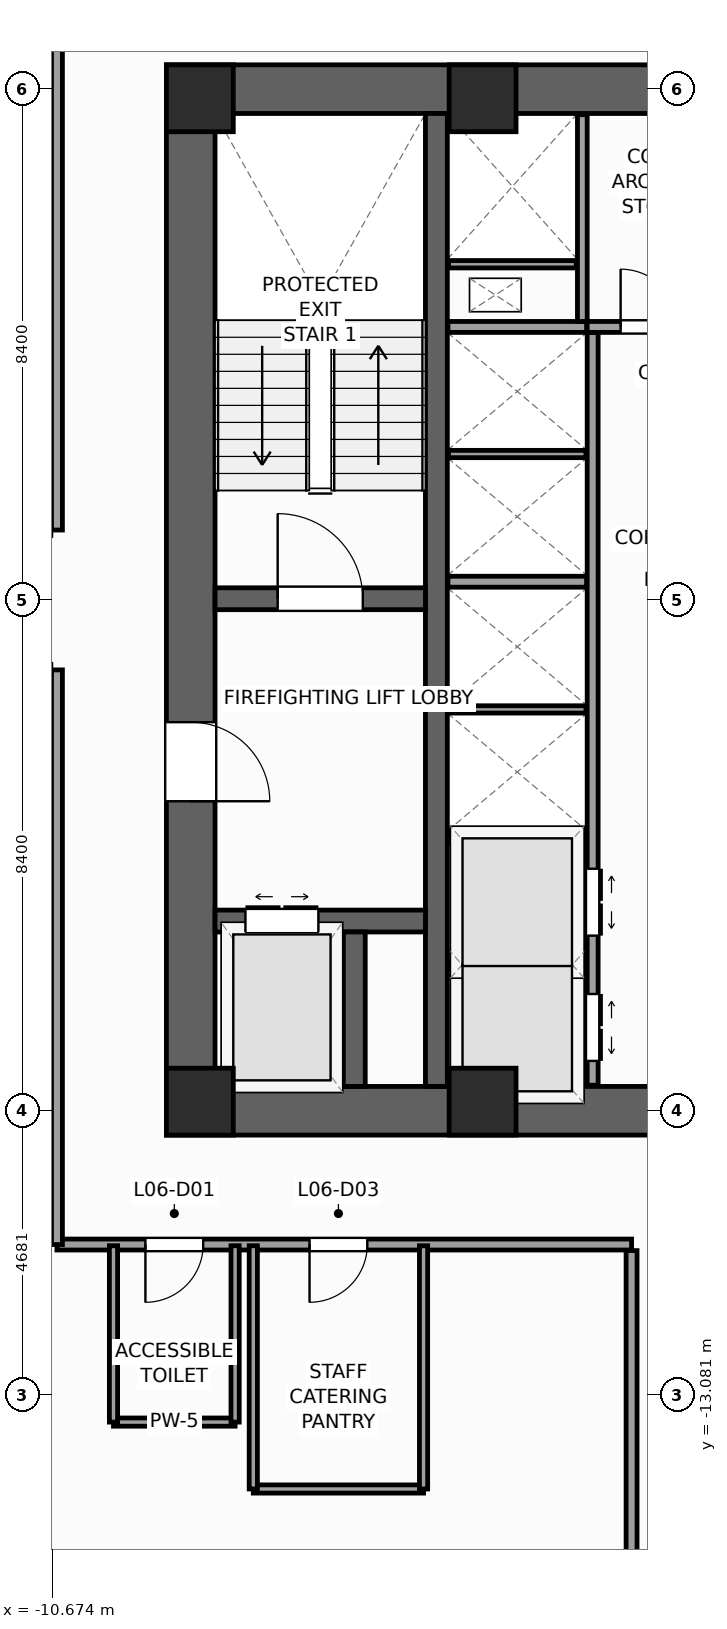
"""IFC4 building model, lengths in metres.
Left out: names, types, materials, properties, quantities, classifications, styles, units other than length and angle.
Written with IfcOpenShell. Run it as: python <this file> out.ifc"""

import sys

from ifc_helpers import new_model, si_unit, direction, frame, frame_2d, origin, origin_2d, place, context, subcontext, project, spatial, rectangle, extrude, source, transform, mapped, element, fill, save


model = new_model("IFC4")
c1 = context("Model", 3, precision=1e-05, world=origin(), true_north=direction((0.0, 1.0)))
c2 = subcontext(c1, "Body", "Model", "MODEL_VIEW")
j1 = project(units=[si_unit("LENGTHUNIT", "METRE"), si_unit("PLANEANGLEUNIT", "RADIAN")], contexts=[c1])
p1 = place(None, origin())
s1 = spatial("IfcSite", under=j1, at=p1, CompositionType="ELEMENT")
p2 = place(p1, origin())
s2 = spatial("IfcBuilding", under=s1, at=p2, CompositionType="ELEMENT")
p3 = place(p2, frame((0.0, 0.0, 30.0)))
s3 = spatial("IfcBuildingStorey", under=s2, at=p3, CompositionType="ELEMENT", Elevation=30.0)
p4 = place(p3, frame((-8.8, -8.4, 0.0), z_axis=(0.0, 0.0, 1.0), x_axis=(1.0, 0.0, 0.0)))
e1 = element("IfcWall", 1, at=p4, inside=s3, PredefinedType="SHEAR", context=c2, shape_type="SweptSolid", body=[
    extrude(rectangle(XDim=17.6, YDim=0.8, at=frame_2d((8.8, 0.0))), origin(), (0.0, 0.0, 1.0), 4.0),
])
p5 = place(p4, frame((8.15, 0.0, 0.0)))
e2 = element("IfcOpeningElement", 2, at=p5, cuts=e1, PredefinedType="OPENING", context=c2, shape_type="SweptSolid", body=[
    extrude(rectangle(XDim=1.3, YDim=2.2, at=frame_2d((0.65, 1.1))), frame((0.0, 0.41, 0.0), z_axis=(0.0, -1.0, 0.0), x_axis=(1.0, 0.0, 0.0)), (0.0, 0.0, 1.0), 0.82),
])
p6 = place(p3, frame((-8.8, 8.4, 0.0), z_axis=(0.0, 0.0, 1.0), x_axis=(1.0, 0.0, 0.0)))
e3 = element("IfcWall", 3, at=p6, inside=s3, PredefinedType="SHEAR", context=c2, shape_type="SweptSolid", body=[
    extrude(rectangle(XDim=17.6, YDim=0.8, at=frame_2d((8.8, 0.0))), origin(), (0.0, 0.0, 1.0), 4.0),
])
p7 = place(p3, frame((-8.4, -8.0, 0.0), z_axis=(0.0, 0.0, 1.0), x_axis=(0.0, 1.0, 0.0)))
e4 = element("IfcWall", 4, at=p7, inside=s3, PredefinedType="SHEAR", context=c2, shape_type="SweptSolid", body=[
    extrude(rectangle(XDim=16.0, YDim=0.8, at=frame_2d((8.0, 0.0))), origin(), (0.0, 0.0, 1.0), 4.0),
])
p8 = place(p7, frame((4.69, 0.0, 0.0)))
e5 = element("IfcOpeningElement", 5, at=p8, cuts=e4, PredefinedType="OPENING", context=c2, shape_type="SweptSolid", body=[
    extrude(rectangle(XDim=1.3, YDim=2.2, at=frame_2d((0.65, 1.1))), frame((0.0, 0.41, 0.0), z_axis=(0.0, -1.0, 0.0), x_axis=(1.0, 0.0, 0.0)), (0.0, 0.0, 1.0), 0.82),
])
p9 = place(p3, frame((-4.36, -8.0, 0.0), z_axis=(0.0, 0.0, 1.0), x_axis=(0.0, 1.0, 0.0)))
e6 = element("IfcWall", 6, at=p9, inside=s3, PredefinedType="SHEAR", context=c2, shape_type="SweptSolid", body=[
    extrude(rectangle(XDim=16.0, YDim=0.36, at=frame_2d((8.0, 0.0))), origin(), (0.0, 0.0, 1.0), 4.0),
])
p10 = place(p3, frame((-8.0, 0.02, 0.0), z_axis=(0.0, 0.0, 1.0), x_axis=(1.0, 0.0, 0.0)))
e7 = element("IfcWall", 7, at=p10, inside=s3, PredefinedType="SHEAR", context=c2, shape_type="SweptSolid", body=[
    extrude(rectangle(XDim=3.46, YDim=0.36, at=frame_2d((1.73, 0.0))), origin(), (0.0, 0.0, 1.0), 4.0),
])
p11 = place(p10, frame((1.03, 0.0, 0.0)))
e8 = element("IfcOpeningElement", 8, at=p11, cuts=e7, PredefinedType="OPENING", context=c2, shape_type="SweptSolid", body=[
    extrude(rectangle(XDim=1.4, YDim=2.2, at=frame_2d((0.7, 1.1))), frame((0.0, 0.19, 0.0), z_axis=(0.0, -1.0, 0.0), x_axis=(1.0, 0.0, 0.0)), (0.0, 0.0, 1.0), 0.38),
])
p12 = place(p3, frame((-8.0, -5.28, 0.0), z_axis=(0.0, 0.0, 1.0), x_axis=(1.0, 0.0, 0.0)))
e9 = element("IfcWall", 9, at=p12, inside=s3, PredefinedType="SHEAR", context=c2, shape_type="SweptSolid", body=[
    extrude(rectangle(XDim=3.46, YDim=0.36, at=frame_2d((1.73, 0.0))), origin(), (0.0, 0.0, 1.0), 4.0),
])
p13 = place(p12, frame((0.5, 0.0, 0.0)))
e10 = element("IfcOpeningElement", 10, at=p13, cuts=e9, PredefinedType="OPENING", context=c2, shape_type="SweptSolid", body=[
    extrude(rectangle(XDim=1.2, YDim=2.25, at=frame_2d((0.6, 1.125))), frame((0.0, 0.19, 0.0), z_axis=(0.0, -1.0, 0.0), x_axis=(1.0, 0.0, 0.0)), (0.0, 0.0, 1.0), 0.38),
])
p14 = place(p3, frame((-5.71, -8.0, 0.0), z_axis=(0.0, 0.0, 1.0), x_axis=(0.0, 1.0, 0.0)))
e11 = element("IfcWall", 11, at=p14, inside=s3, PredefinedType="SHEAR", context=c2, shape_type="SweptSolid", body=[
    extrude(rectangle(XDim=2.54, YDim=0.36, at=frame_2d((1.27, 0.0))), origin(), (0.0, 0.0, 1.0), 4.0),
])
m1 = source(origin(), c2, "Body", "SweptSolid", [
    extrude(rectangle(XDim=1.1, YDim=1.1, at=origin_2d()), origin(), (0.0, 0.0, 1.0), 4.0),
])
for number, where, z_axis, x_axis in (
    (12, (-8.25, -8.25, 0.0), (0.0, 0.0, 1.0), (1.0, 0.0, 0.0)),
    (13, (-8.25, 8.25, 0.0), (0.0, 0.0, 1.0), (1.0, 0.0, 0.0)),
    (14, (-3.6, -8.25, 0.0), (0.0, 0.0, 1.0), (1.0, 0.0, 0.0)),
    (15, (-3.6, 8.25, 0.0), (0.0, 0.0, 1.0), (1.0, 0.0, 0.0)),
):
    element("IfcColumn", number, at=place(p3, frame(where, z_axis=z_axis, x_axis=x_axis)), inside=s3, PredefinedType="PILASTER", context=c2, shape_type="MappedRepresentation", body=[
        mapped(m1, transform((0.0, 0.0, 0.0), scale=1.0)),
    ])
p15 = place(p3, frame((-1.79, -7.98, 0.0), z_axis=(0.0, 0.0, 1.0), x_axis=(0.0, 1.0, 0.0)))
e16 = element("IfcWall", 16, at=p15, inside=s3, PredefinedType="PARTITIONING", context=c2, shape_type="SweptSolid", body=[
    extrude(rectangle(XDim=12.38, YDim=0.18, at=frame_2d((6.19, 0.0))), origin(), (0.0, 0.0, 1.0), 3.72),
])
p16 = place(p15, frame((0.4, 0.0, 0.0)))
e17 = element("IfcOpeningElement", 17, at=p16, cuts=e16, PredefinedType="OPENING", context=c2, shape_type="SweptSolid", body=[
    extrude(rectangle(XDim=1.1, YDim=2.2, at=frame_2d((0.55, 1.1))), frame((0.0, 0.1, 0.0), z_axis=(0.0, -1.0, 0.0), x_axis=(1.0, 0.0, 0.0)), (0.0, 0.0, 1.0), 0.2),
])
p17 = place(p15, frame((2.46, 0.0, 0.0)))
e18 = element("IfcOpeningElement", 18, at=p17, cuts=e16, PredefinedType="OPENING", context=c2, shape_type="SweptSolid", body=[
    extrude(rectangle(XDim=1.1, YDim=2.2, at=frame_2d((0.55, 1.1))), frame((0.0, 0.1, 0.0), z_axis=(0.0, -1.0, 0.0), x_axis=(1.0, 0.0, 0.0)), (0.0, 0.0, 1.0), 0.2),
])
p18 = place(p3, frame((-1.88, 4.49, 0.0), z_axis=(0.0, 0.0, 1.0), x_axis=(1.0, 0.0, 0.0)))
e19 = element("IfcWall", 19, at=p18, inside=s3, PredefinedType="PARTITIONING", context=c2, shape_type="SweptSolid", body=[
    extrude(rectangle(XDim=3.76, YDim=0.18, at=frame_2d((1.88, 0.0))), origin(), (0.0, 0.0, 1.0), 3.72),
])
p19 = place(p18, frame((0.55, 0.0, 0.0)))
e20 = element("IfcOpeningElement", 20, at=p19, cuts=e19, PredefinedType="OPENING", context=c2, shape_type="SweptSolid", body=[
    extrude(rectangle(XDim=0.95, YDim=2.1, at=frame_2d((0.475, 1.05))), frame((0.0, 0.1, 0.0), z_axis=(0.0, -1.0, 0.0), x_axis=(1.0, 0.0, 0.0)), (0.0, 0.0, 1.0), 0.2),
])
p20 = place(p18, frame((2.56, 0.0, 0.0)))
e21 = element("IfcOpeningElement", 21, at=p20, cuts=e19, PredefinedType="OPENING", context=c2, shape_type="SweptSolid", body=[
    extrude(rectangle(XDim=0.88, YDim=2.1, at=frame_2d((0.44, 1.05))), frame((0.0, 0.1, 0.0), z_axis=(0.0, -1.0, 0.0), x_axis=(1.0, 0.0, 0.0)), (0.0, 0.0, 1.0), 0.2),
])
for number, where, z_axis, x_axis in (
    (22, (-4.17, -3.9, 0.0), (0.0, 0.0, 1.0), (1.0, 0.0, 0.0)),
    (23, (-4.17, 0.3, 0.0), (0.0, 0.0, 1.0), (1.0, 0.0, 0.0)),
    (24, (-4.17, 4.49, 0.0), (0.0, 0.0, 1.0), (1.0, 0.0, 0.0)),
):
    element("IfcWall", number, at=place(p3, frame(where, z_axis=z_axis, x_axis=x_axis)), inside=s3, PredefinedType="PARTITIONING", context=c2, shape_type="SweptSolid", body=[
        extrude(rectangle(XDim=2.28, YDim=0.18, at=frame_2d((1.14, 0.0))), origin(), (0.0, 0.0, 1.0), 3.72),
    ])
for number, where, z_axis, x_axis in (
    (25, (-4.16, -6.0, 0.0), (0.0, 0.0, 1.0), (1.0, 0.0, 0.0)),
    (26, (-4.16, -1.8, 0.0), (0.0, 0.0, 1.0), (1.0, 0.0, 0.0)),
    (27, (-4.16, 2.4, 0.0), (0.0, 0.0, 1.0), (1.0, 0.0, 0.0)),
):
    element("IfcWall", number, at=place(p3, frame(where, z_axis=z_axis, x_axis=x_axis)), inside=s3, PredefinedType="PARTITIONING", context=c2, shape_type="SweptSolid", body=[
        extrude(rectangle(XDim=2.26, YDim=0.12, at=frame_2d((1.13, 0.0))), origin(), (0.0, 0.0, 1.0), 3.72),
    ])
p21 = place(p3, frame((-1.96, 4.58, 0.0), z_axis=(0.0, 0.0, 1.0), x_axis=(0.0, 1.0, 0.0)))
e28 = element("IfcWall", 28, at=p21, inside=s3, PredefinedType="PARTITIONING", context=c2, shape_type="SweptSolid", body=[
    extrude(rectangle(XDim=3.4, YDim=0.16, at=frame_2d((1.7, 0.0))), origin(), (0.0, 0.0, 1.0), 3.72),
])
p22 = place(p3, frame((-4.16, 5.52, 0.0), z_axis=(0.0, 0.0, 1.0), x_axis=(1.0, 0.0, 0.0)))
e29 = element("IfcWall", 29, at=p22, inside=s3, PredefinedType="PARTITIONING", context=c2, shape_type="SweptSolid", body=[
    extrude(rectangle(XDim=2.1, YDim=0.12, at=frame_2d((1.05, 0.0))), origin(), (0.0, 0.0, 1.0), 3.72),
])
p23 = place(p3, frame((-10.6, -10.6, 0.0), z_axis=(0.0, 0.0, 1.0), x_axis=(1.0, 0.0, 0.0)))
e30 = element("IfcWall", 30, at=p23, inside=s3, PredefinedType="PARTITIONING", context=c2, shape_type="SweptSolid", body=[
    extrude(rectangle(XDim=9.45, YDim=0.18, at=frame_2d((4.725, 0.0))), origin(), (0.0, 0.0, 1.0), 3.72),
])
p24 = place(p23, frame((1.455, 0.0, 0.0)))
e31 = element("IfcOpeningElement", 31, at=p24, cuts=e30, PredefinedType="OPENING", context=c2, shape_type="SweptSolid", body=[
    extrude(rectangle(XDim=0.95, YDim=2.1, at=frame_2d((0.475, 1.05))), frame((0.0, 0.1, 0.0), z_axis=(0.0, -1.0, 0.0), x_axis=(1.0, 0.0, 0.0)), (0.0, 0.0, 1.0), 0.2),
])
p25 = place(p23, frame((4.154, 0.0, 0.0)))
e32 = element("IfcOpeningElement", 32, at=p25, cuts=e30, PredefinedType="OPENING", context=c2, shape_type="SweptSolid", body=[
    extrude(rectangle(XDim=0.95, YDim=2.1, at=frame_2d((0.475, 1.05))), frame((0.0, 0.1, 0.0), z_axis=(0.0, -1.0, 0.0), x_axis=(1.0, 0.0, 0.0)), (0.0, 0.0, 1.0), 0.2),
])
for number, where, z_axis, x_axis in (
    (33, (-10.6, -10.6, 0.0), (0.0, 0.0, 1.0), (0.0, 1.0, 0.0)),
    (34, (-10.6, 1.15, 0.0), (0.0, 0.0, 1.0), (0.0, 1.0, 0.0)),
):
    element("IfcWall", number, at=place(p3, frame(where, z_axis=z_axis, x_axis=x_axis)), inside=s3, PredefinedType="PARTITIONING", context=c2, shape_type="SweptSolid", body=[
        extrude(rectangle(XDim=9.45, YDim=0.18, at=frame_2d((4.725, 0.0))), origin(), (0.0, 0.0, 1.0), 3.72),
    ])
p26 = place(p3, frame((-1.15, -28.685, 0.0), z_axis=(0.0, 0.0, 1.0), x_axis=(0.0, 1.0, 0.0)))
e35 = element("IfcWall", 35, at=p26, inside=s3, PredefinedType="PARTITIONING", context=c2, shape_type="SweptSolid", body=[
    extrude(rectangle(XDim=17.985, YDim=0.18, at=frame_2d((8.993, 0.0))), origin(), (0.0, 0.0, 1.0), 3.72),
])
p27 = place(p3, frame((-9.67, -13.52, 0.0), z_axis=(0.0, 0.0, 1.0), x_axis=(1.0, 0.0, 0.0)))
e36 = element("IfcWall", 36, at=p27, inside=s3, PredefinedType="PARTITIONING", context=c2, shape_type="SweptSolid", body=[
    extrude(rectangle(XDim=2.0, YDim=0.135, at=frame_2d((1.0, 0.0))), origin(), (0.0, 0.0, 1.0), 3.72),
])
for number, where, z_axis, x_axis in (
    (37, (-7.67, -13.52, 0.0), (0.0, 0.0, 1.0), (0.0, 1.0, 0.0)),
    (38, (-9.67, -13.52, 0.0), (0.0, 0.0, 1.0), (0.0, 1.0, 0.0)),
):
    element("IfcWall", number, at=place(p3, frame(where, z_axis=z_axis, x_axis=x_axis)), inside=s3, PredefinedType="PARTITIONING", context=c2, shape_type="SweptSolid", body=[
        extrude(rectangle(XDim=2.9, YDim=0.135, at=frame_2d((1.45, 0.0))), origin(), (0.0, 0.0, 1.0), 3.72),
    ])
p28 = place(p3, frame((-7.371, -14.62, 0.0), z_axis=(0.0, 0.0, 1.0), x_axis=(1.0, 0.0, 0.0)))
e39 = element("IfcWall", 39, at=p28, inside=s3, PredefinedType="PARTITIONING", context=c2, shape_type="SweptSolid", body=[
    extrude(rectangle(XDim=2.8, YDim=0.135, at=frame_2d((1.4, 0.0))), origin(), (0.0, 0.0, 1.0), 3.72),
])
for number, where, z_axis, x_axis in (
    (40, (-4.571, -14.62, 0.0), (0.0, 0.0, 1.0), (0.0, 1.0, 0.0)),
    (41, (-7.371, -14.62, 0.0), (0.0, 0.0, 1.0), (0.0, 1.0, 0.0)),
):
    element("IfcWall", number, at=place(p3, frame(where, z_axis=z_axis, x_axis=x_axis)), inside=s3, PredefinedType="PARTITIONING", context=c2, shape_type="SweptSolid", body=[
        extrude(rectangle(XDim=4.0, YDim=0.135, at=frame_2d((2.0, 0.0))), origin(), (0.0, 0.0, 1.0), 3.72),
    ])
m2 = source(origin(), c2, "Body", "SweptSolid", [
    extrude(rectangle(XDim=1.4, YDim=2.2, at=frame_2d((0.7, 1.1))), frame((0.0, 0.025, 0.0), z_axis=(0.0, -1.0, 0.0), x_axis=(1.0, 0.0, 0.0)), (0.0, 0.0, 1.0), 0.05),
])
p29 = place(p11, origin())
e42 = element("IfcDoor", 42, at=p29, inside=s3, OperationType="SINGLE_SWING_LEFT", PredefinedType="DOOR", context=c2, shape_type="MappedRepresentation", body=[
    mapped(m2, transform((0.0, 0.0, 0.0), scale=1.0)),
])
fill(e8, e42)
m3 = source(origin(), c2, "Body", "SweptSolid", [
    extrude(rectangle(XDim=1.3, YDim=2.2, at=frame_2d((0.65, 1.1))), frame((0.0, 0.025, 0.0), z_axis=(0.0, -1.0, 0.0), x_axis=(1.0, 0.0, 0.0)), (0.0, 0.0, 1.0), 0.05),
])
p30 = place(p8, frame((1.3, 0.0, 0.0), z_axis=(0.0, 0.0, 1.0), x_axis=(-1.0, 0.0, 0.0)))
e43 = element("IfcDoor", 43, at=p30, inside=s3, OperationType="SINGLE_SWING_LEFT", PredefinedType="DOOR", context=c2, shape_type="MappedRepresentation", body=[
    mapped(m3, transform((0.0, 0.0, 0.0), scale=1.0)),
])
fill(e5, e43)
m4 = source(origin(), c2, "Body", "SweptSolid", [
    extrude(rectangle(XDim=1.2, YDim=2.25, at=frame_2d((0.6, 1.125))), frame((0.0, 0.025, 0.0), z_axis=(0.0, -1.0, 0.0), x_axis=(1.0, 0.0, 0.0)), (0.0, 0.0, 1.0), 0.05),
])
p31 = place(p13, origin())
e44 = element("IfcDoor", 44, at=p31, inside=s3, OperationType="DOUBLE_DOOR_SLIDING", PredefinedType="DOOR", context=c2, shape_type="MappedRepresentation", body=[
    mapped(m4, transform((0.0, 0.0, 0.0), scale=1.0)),
])
fill(e10, e44)
m5 = source(origin(), c2, "Body", "SweptSolid", [
    extrude(rectangle(XDim=1.1, YDim=2.2, at=frame_2d((0.55, 1.1))), frame((0.0, 0.025, 0.0), z_axis=(0.0, -1.0, 0.0), x_axis=(1.0, 0.0, 0.0)), (0.0, 0.0, 1.0), 0.05),
])
p32 = place(p16, frame((1.1, 0.0, 0.0), z_axis=(0.0, 0.0, 1.0), x_axis=(-1.0, 0.0, 0.0)))
e45 = element("IfcDoor", 45, at=p32, inside=s3, OperationType="DOUBLE_DOOR_SLIDING", PredefinedType="DOOR", context=c2, shape_type="MappedRepresentation", body=[
    mapped(m5, transform((0.0, 0.0, 0.0), scale=1.0)),
])
fill(e17, e45)
p33 = place(p17, frame((1.1, 0.0, 0.0), z_axis=(0.0, 0.0, 1.0), x_axis=(-1.0, 0.0, 0.0)))
e46 = element("IfcDoor", 46, at=p33, inside=s3, OperationType="DOUBLE_DOOR_SLIDING", PredefinedType="DOOR", context=c2, shape_type="MappedRepresentation", body=[
    mapped(m5, transform((0.0, 0.0, 0.0), scale=1.0)),
])
fill(e18, e46)
m6 = source(origin(), c2, "Body", "SweptSolid", [
    extrude(rectangle(XDim=0.95, YDim=2.1, at=frame_2d((0.475, 1.05))), frame((0.0, 0.025, 0.0), z_axis=(0.0, -1.0, 0.0), x_axis=(1.0, 0.0, 0.0)), (0.0, 0.0, 1.0), 0.05),
])
p34 = place(p19, origin())
e47 = element("IfcDoor", 47, at=p34, inside=s3, OperationType="SINGLE_SWING_LEFT", PredefinedType="DOOR", context=c2, shape_type="MappedRepresentation", body=[
    mapped(m6, transform((0.0, 0.0, 0.0), scale=1.0)),
])
fill(e20, e47)
p35 = place(p24, frame((0.95, 0.0, 0.0), z_axis=(0.0, 0.0, 1.0), x_axis=(-1.0, 0.0, 0.0)))
e48 = element("IfcDoor", 48, at=p35, inside=s3, OperationType="SINGLE_SWING_LEFT", PredefinedType="DOOR", context=c2, shape_type="MappedRepresentation", body=[
    mapped(m6, transform((0.0, 0.0, 0.0), scale=1.0)),
])
fill(e31, e48)
p36 = place(p25, frame((0.95, 0.0, 0.0), z_axis=(0.0, 0.0, 1.0), x_axis=(-1.0, 0.0, 0.0)))
e49 = element("IfcDoor", 49, at=p36, inside=s3, OperationType="SINGLE_SWING_LEFT", PredefinedType="DOOR", context=c2, shape_type="MappedRepresentation", body=[
    mapped(m6, transform((0.0, 0.0, 0.0), scale=1.0)),
])
fill(e32, e49)
save(model, sys.argv[1])
